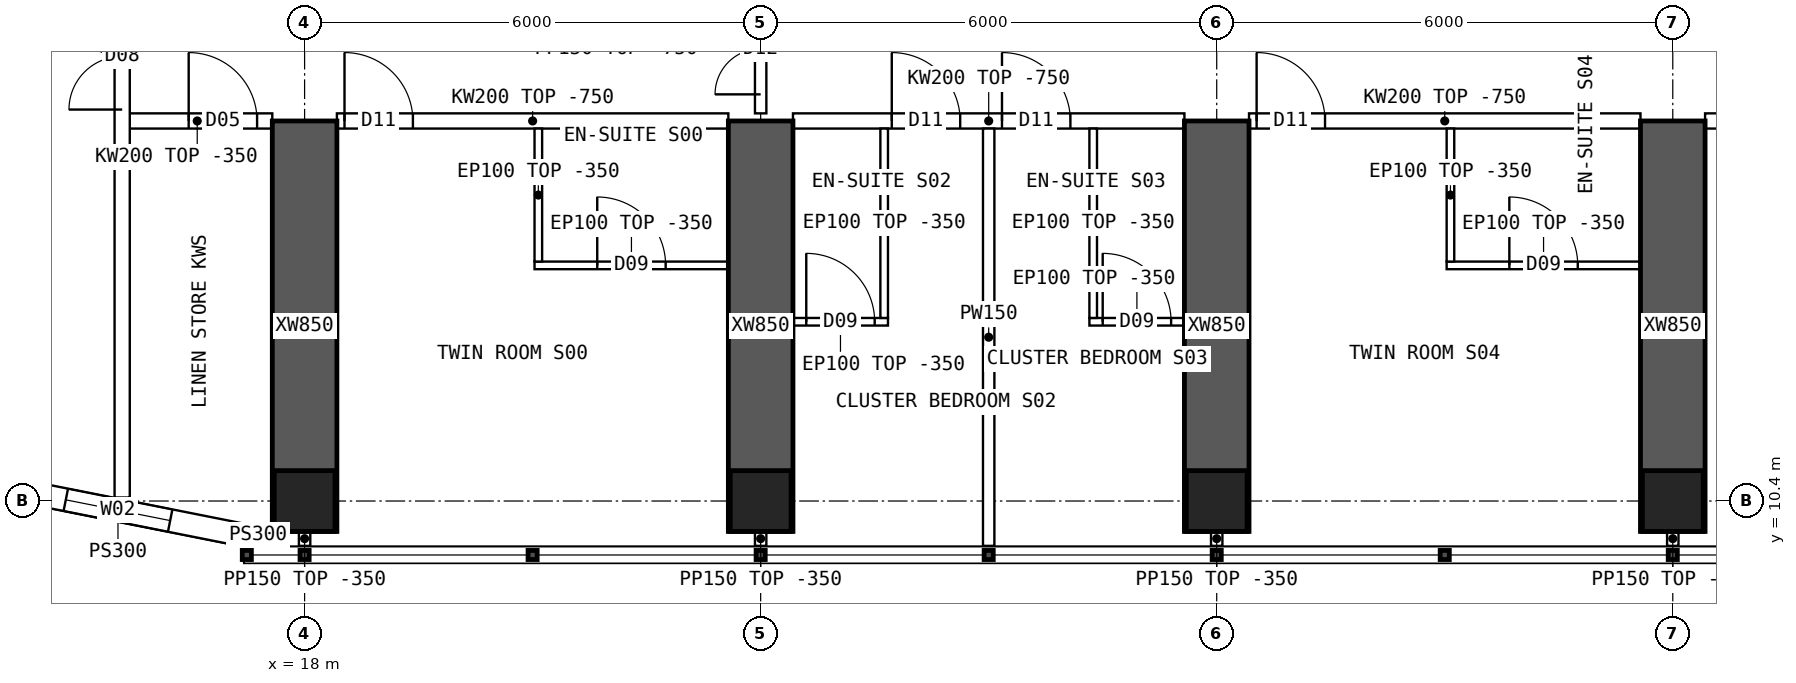
"""IFC4 building model, lengths in metres.
Left out: names, types, materials, properties, quantities, classifications, styles, units other than length and angle.
Written with IfcOpenShell. Run it as: python <this file> out.ifc"""

import sys

from ifc_helpers import new_model, si_unit, direction, frame, frame_2d, origin, origin_2d, place, context, subcontext, project, spatial, polyline, rectangle, hollow_rectangle, outline, extrude, element, fill, save


model = new_model("IFC4")
c1 = context("Model", 3, precision=1e-05, world=origin(), true_north=direction((0.0, 1.0)))
c2 = subcontext(c1, "Body", "Model", "MODEL_VIEW")
j1 = project(units=[si_unit("LENGTHUNIT", "METRE"), si_unit("PLANEANGLEUNIT", "RADIAN")], contexts=[c1])
p1 = place(None, origin())
s1 = spatial("IfcSite", under=j1, at=p1, CompositionType="ELEMENT")
p2 = place(p1, origin())
s2 = spatial("IfcBuilding", under=s1, at=p2, CompositionType="ELEMENT")
p3 = place(p2, frame((0.0, 0.0, 197.35)))
s3 = spatial("IfcBuildingStorey", under=s2, at=p3, CompositionType="ELEMENT", Elevation=197.35)
for number, where, z_axis, x_axis in (
    (1, (18.0, 10.4, 0.0), (0.0, 0.0, 1.0), (1.0, 0.0, 0.0)),
    (2, (24.0, 10.4, 0.0), (0.0, 0.0, 1.0), (1.0, 0.0, 0.0)),
    (3, (30.0, 10.4, 0.0), (0.0, 0.0, 1.0), (1.0, 0.0, 0.0)),
    (4, (36.0, 10.4, 0.0), (0.0, 0.0, 1.0), (1.0, 0.0, 0.0)),
):
    element("IfcColumn", number, at=place(p3, frame(where, z_axis=z_axis, x_axis=x_axis)), inside=s3, PredefinedType="COLUMN", context=c2, shape_type="SweptSolid", body=[
        extrude(hollow_rectangle(XDim=0.8, YDim=0.8, WallThickness=0.08, at=origin_2d()), origin(), (0.0, 0.0, 1.0), 3.75),
    ])
for number, where, z_axis, x_axis in (
    (5, (18.0, 10.0, 0.0), (0.0, 0.0, 1.0), (0.0, 1.0, 0.0)),
    (6, (24.0, 10.0, 0.0), (0.0, 0.0, 1.0), (0.0, 1.0, 0.0)),
    (7, (30.0, 10.0, 0.0), (0.0, 0.0, 1.0), (0.0, 1.0, 0.0)),
    (8, (36.0, 10.0, 0.0), (0.0, 0.0, 1.0), (0.0, 1.0, 0.0)),
):
    element("IfcWall", number, at=place(p3, frame(where, z_axis=z_axis, x_axis=x_axis)), inside=s3, PredefinedType="SHEAR", context=c2, shape_type="SweptSolid", body=[
        extrude(rectangle(XDim=5.4, YDim=0.85, at=frame_2d((2.7, 0.0))), origin(), (0.0, 0.0, 1.0), 3.75),
    ])
p4 = place(p3, frame((13.89, 10.608, 0.0), z_axis=(0.0, 0.0, 1.0), x_axis=(0.98078325777, -0.195100490205, 0.0)))
e9 = element("IfcWall", 9, at=p4, inside=s3, PredefinedType="SOLIDWALL", context=c2, shape_type="SweptSolid", body=[
    extrude(outline(polyline([(-0.03, -0.15), (3.405, -0.15), (3.345, 0.15), (0.03, 0.15), (-0.03, -0.15)])), origin(), (0.0, 0.0, 1.0), 3.4),
])
p5 = place(p4, frame((0.988, 0.0, 0.9)))
e10 = element("IfcOpeningElement", 10, at=p5, cuts=e9, PredefinedType="OPENING", context=c2, shape_type="SweptSolid", body=[
    extrude(rectangle(XDim=1.4, YDim=1.8, at=frame_2d((0.7, 0.9))), frame((0.0, 0.16, 0.0), z_axis=(0.0, -1.0, 0.0), x_axis=(1.0, 0.0, 0.0)), (0.0, 0.0, 1.0), 0.32),
])
p6 = place(p3, frame((17.2, 9.95, 0.0), z_axis=(0.0, 0.0, 1.0), x_axis=(1.0, 0.0, 0.0)))
e11 = element("IfcWall", 11, at=p6, inside=s3, PredefinedType="SOLIDWALL", context=c2, shape_type="SweptSolid", body=[
    extrude(rectangle(XDim=0.375, YDim=0.3, at=frame_2d((0.188, 0.0))), origin(), (0.0, 0.0, 1.0), 3.4),
])
p7 = place(p3, frame((15.6, 15.4, 0.0), z_axis=(0.0, 0.0, 1.0), x_axis=(1.0, 0.0, 0.0)))
e12 = element("IfcWall", 12, at=p7, inside=s3, PredefinedType="SOLIDWALL", context=c2, shape_type="SweptSolid", body=[
    extrude(rectangle(XDim=1.975, YDim=0.2, at=frame_2d((0.987, 0.0))), origin(), (0.0, 0.0, 1.0), 3.4),
])
p8 = place(p7, frame((0.875, 0.0, 0.0)))
e13 = element("IfcOpeningElement", 13, at=p8, cuts=e12, PredefinedType="OPENING", context=c2, shape_type="SweptSolid", body=[
    extrude(rectangle(XDim=0.9, YDim=2.1, at=frame_2d((0.45, 1.05))), frame((0.0, 0.11, 0.0), z_axis=(0.0, -1.0, 0.0), x_axis=(1.0, 0.0, 0.0)), (0.0, 0.0, 1.0), 0.22),
])
p9 = place(p3, frame((18.425, 15.4, 0.0), z_axis=(0.0, 0.0, 1.0), x_axis=(1.0, 0.0, 0.0)))
e14 = element("IfcWall", 14, at=p9, inside=s3, PredefinedType="SOLIDWALL", context=c2, shape_type="SweptSolid", body=[
    extrude(outline(polyline([(0.0, 0.0), (5.15, 0.0), (5.15, 3.0), (0.0, 3.0), (0.0, 0.0)])), frame((0.0, 0.1, 0.0), z_axis=(0.0, -1.0, 0.0), x_axis=(1.0, 0.0, 0.0)), (0.0, 0.0, 1.0), 0.2),
])
p10 = place(p9, frame((0.1, 0.0, 0.0)))
e15 = element("IfcOpeningElement", 15, at=p10, cuts=e14, PredefinedType="OPENING", context=c2, shape_type="SweptSolid", body=[
    extrude(rectangle(XDim=0.9, YDim=2.1, at=frame_2d((0.45, 1.05))), frame((0.0, 0.11, 0.0), z_axis=(0.0, -1.0, 0.0), x_axis=(1.0, 0.0, 0.0)), (0.0, 0.0, 1.0), 0.22),
])
p11 = place(p3, frame((24.425, 15.4, 0.0), z_axis=(0.0, 0.0, 1.0), x_axis=(1.0, 0.0, 0.0)))
e16 = element("IfcWall", 16, at=p11, inside=s3, PredefinedType="SOLIDWALL", context=c2, shape_type="SweptSolid", body=[
    extrude(outline(polyline([(0.0, 0.0), (5.15, 0.0), (5.15, 3.0), (0.0, 3.0), (0.0, 0.0)])), frame((0.0, 0.1, 0.0), z_axis=(0.0, -1.0, 0.0), x_axis=(1.0, 0.0, 0.0)), (0.0, 0.0, 1.0), 0.2),
])
p12 = place(p11, frame((1.3, 0.0, 0.0)))
e17 = element("IfcOpeningElement", 17, at=p12, cuts=e16, PredefinedType="OPENING", context=c2, shape_type="SweptSolid", body=[
    extrude(rectangle(XDim=0.9, YDim=2.1, at=frame_2d((0.45, 1.05))), frame((0.0, 0.11, 0.0), z_axis=(0.0, -1.0, 0.0), x_axis=(1.0, 0.0, 0.0)), (0.0, 0.0, 1.0), 0.22),
])
p13 = place(p11, frame((2.75, 0.0, 0.0)))
e18 = element("IfcOpeningElement", 18, at=p13, cuts=e16, PredefinedType="OPENING", context=c2, shape_type="SweptSolid", body=[
    extrude(rectangle(XDim=0.9, YDim=2.1, at=frame_2d((0.45, 1.05))), frame((0.0, 0.11, 0.0), z_axis=(0.0, -1.0, 0.0), x_axis=(1.0, 0.0, 0.0)), (0.0, 0.0, 1.0), 0.22),
])
p14 = place(p3, frame((30.425, 15.4, 0.0), z_axis=(0.0, 0.0, 1.0), x_axis=(1.0, 0.0, 0.0)))
e19 = element("IfcWall", 19, at=p14, inside=s3, PredefinedType="SOLIDWALL", context=c2, shape_type="SweptSolid", body=[
    extrude(outline(polyline([(0.0, 0.0), (5.15, 0.0), (5.15, 3.0), (0.0, 3.0), (0.0, 0.0)])), frame((0.0, 0.1, 0.0), z_axis=(0.0, -1.0, 0.0), x_axis=(1.0, 0.0, 0.0)), (0.0, 0.0, 1.0), 0.2),
])
p15 = place(p14, frame((0.1, 0.0, 0.0)))
e20 = element("IfcOpeningElement", 20, at=p15, cuts=e19, PredefinedType="OPENING", context=c2, shape_type="SweptSolid", body=[
    extrude(rectangle(XDim=0.9, YDim=2.1, at=frame_2d((0.45, 1.05))), frame((0.0, 0.11, 0.0), z_axis=(0.0, -1.0, 0.0), x_axis=(1.0, 0.0, 0.0)), (0.0, 0.0, 1.0), 0.22),
])
p16 = place(p3, frame((36.425, 15.4, 0.0), z_axis=(0.0, 0.0, 1.0), x_axis=(1.0, 0.0, 0.0)))
e21 = element("IfcWall", 21, at=p16, inside=s3, PredefinedType="SOLIDWALL", context=c2, shape_type="SweptSolid", body=[
    extrude(outline(polyline([(0.0, 0.0), (5.15, 0.0), (5.15, 3.0), (0.0, 3.0), (0.0, 0.0)])), frame((0.0, 0.1, 0.0), z_axis=(0.0, -1.0, 0.0), x_axis=(1.0, 0.0, 0.0)), (0.0, 0.0, 1.0), 0.2),
])
p17 = place(p16, frame((0.3, 0.0, 0.0)))
e22 = element("IfcOpeningElement", 22, at=p17, cuts=e21, PredefinedType="OPENING", context=c2, shape_type="SweptSolid", body=[
    extrude(rectangle(XDim=1.0, YDim=2.1, at=frame_2d((0.5, 1.05))), frame((0.0, 0.11, 0.0), z_axis=(0.0, -1.0, 0.0), x_axis=(1.0, 0.0, 0.0)), (0.0, 0.0, 1.0), 0.22),
])
p18 = place(p3, frame((23.575, 13.5, 0.0), z_axis=(0.0, 0.0, 1.0), x_axis=(-1.0, 0.0, 0.0)))
e23 = element("IfcWall", 23, at=p18, inside=s3, PredefinedType="PARTITIONING", context=c2, shape_type="SweptSolid", body=[
    extrude(rectangle(XDim=2.55, YDim=0.1, at=frame_2d((1.275, 0.0))), origin(), (0.0, 0.0, 1.0), 3.4),
])
p19 = place(p18, frame((0.825, 0.0, 0.0)))
e24 = element("IfcOpeningElement", 24, at=p19, cuts=e23, PredefinedType="OPENING", context=c2, shape_type="SweptSolid", body=[
    extrude(rectangle(XDim=0.9, YDim=2.1, at=frame_2d((0.45, 1.05))), frame((0.0, 0.06, 0.0), z_axis=(0.0, -1.0, 0.0), x_axis=(1.0, 0.0, 0.0)), (0.0, 0.0, 1.0), 0.12),
])
p20 = place(p3, frame((21.075, 13.55, 0.0), z_axis=(0.0, 0.0, 1.0), x_axis=(0.0, 1.0, 0.0)))
e25 = element("IfcWall", 25, at=p20, inside=s3, PredefinedType="PARTITIONING", context=c2, shape_type="SweptSolid", body=[
    extrude(outline(polyline([(0.0, 0.0), (1.75, 0.0), (1.75, 3.0), (1.702, 3.0), (1.7, 3.4), (0.0, 3.4), (0.0, 0.0)])), frame((0.0, 0.05, 0.0), z_axis=(0.0, -1.0, 0.0), x_axis=(1.0, 0.0, 0.0)), (0.0, 0.0, 1.0), 0.1),
])
p21 = place(p3, frame((27.0, 9.81, 0.0), z_axis=(0.0, 0.0, 1.0), x_axis=(0.0, 1.0, 0.0)))
e26 = element("IfcWall", 26, at=p21, inside=s3, PredefinedType="PARTITIONING", context=c2, shape_type="SweptSolid", body=[
    extrude(outline(polyline([(0.0, 0.0), (5.49, 0.0), (5.49, 3.0), (5.442, 3.0), (5.44, 3.4), (0.792, 3.4), (0.79, 3.0), (0.392, 3.0), (0.39, 3.4), (0.0, 3.4), (0.0, 0.0)])), frame((0.0, 0.075, 0.0), z_axis=(0.0, -1.0, 0.0), x_axis=(1.0, 0.0, 0.0)), (0.0, 0.0, 1.0), 0.15),
])
p22 = place(p3, frame((25.675, 12.758, 0.0), z_axis=(0.0, 0.0, 1.0), x_axis=(-1.0, 0.0, 0.0)))
e27 = element("IfcWall", 27, at=p22, inside=s3, PredefinedType="PARTITIONING", context=c2, shape_type="SweptSolid", body=[
    extrude(rectangle(XDim=1.25, YDim=0.1, at=frame_2d((0.625, 0.0))), origin(), (0.0, 0.0, 1.0), 3.4),
])
p23 = place(p22, frame((0.175, 0.0, 0.0)))
e28 = element("IfcOpeningElement", 28, at=p23, cuts=e27, PredefinedType="OPENING", context=c2, shape_type="SweptSolid", body=[
    extrude(rectangle(XDim=0.9, YDim=2.1, at=frame_2d((0.45, 1.05))), frame((0.0, 0.06, 0.0), z_axis=(0.0, -1.0, 0.0), x_axis=(1.0, 0.0, 0.0)), (0.0, 0.0, 1.0), 0.12),
])
p24 = place(p3, frame((25.625, 12.808, 0.0), z_axis=(0.0, 0.0, 1.0), x_axis=(0.0, 1.0, 0.0)))
e29 = element("IfcWall", 29, at=p24, inside=s3, PredefinedType="PARTITIONING", context=c2, shape_type="SweptSolid", body=[
    extrude(outline(polyline([(0.0, 0.0), (2.492, 0.0), (2.492, 3.0), (2.444, 3.0), (2.442, 3.4), (0.0, 3.4), (0.0, 0.0)])), frame((0.0, 0.05, 0.0), z_axis=(0.0, -1.0, 0.0), x_axis=(1.0, 0.0, 0.0)), (0.0, 0.0, 1.0), 0.1),
])
p25 = place(p3, frame((29.575, 12.758, 0.0), z_axis=(0.0, 0.0, 1.0), x_axis=(-1.0, 0.0, 0.0)))
e30 = element("IfcWall", 30, at=p25, inside=s3, PredefinedType="PARTITIONING", context=c2, shape_type="SweptSolid", body=[
    extrude(rectangle(XDim=1.25, YDim=0.1, at=frame_2d((0.625, 0.0))), origin(), (0.0, 0.0, 1.0), 3.4),
])
p26 = place(p25, frame((0.175, 0.0, 0.0)))
e31 = element("IfcOpeningElement", 31, at=p26, cuts=e30, PredefinedType="OPENING", context=c2, shape_type="SweptSolid", body=[
    extrude(rectangle(XDim=0.9, YDim=2.1, at=frame_2d((0.45, 1.05))), frame((0.0, 0.06, 0.0), z_axis=(0.0, -1.0, 0.0), x_axis=(1.0, 0.0, 0.0)), (0.0, 0.0, 1.0), 0.12),
])
p27 = place(p3, frame((28.375, 12.808, 0.0), z_axis=(0.0, 0.0, 1.0), x_axis=(0.0, 1.0, 0.0)))
e32 = element("IfcWall", 32, at=p27, inside=s3, PredefinedType="PARTITIONING", context=c2, shape_type="SweptSolid", body=[
    extrude(outline(polyline([(0.0, 0.0), (2.492, 0.0), (2.492, 3.0), (2.444, 3.0), (2.442, 3.4), (0.0, 3.4), (0.0, 0.0)])), frame((0.0, 0.05, 0.0), z_axis=(0.0, -1.0, 0.0), x_axis=(1.0, 0.0, 0.0)), (0.0, 0.0, 1.0), 0.1),
])
p28 = place(p3, frame((35.575, 13.5, 0.0), z_axis=(0.0, 0.0, 1.0), x_axis=(-1.0, 0.0, 0.0)))
e33 = element("IfcWall", 33, at=p28, inside=s3, PredefinedType="PARTITIONING", context=c2, shape_type="SweptSolid", body=[
    extrude(rectangle(XDim=2.55, YDim=0.1, at=frame_2d((1.275, 0.0))), origin(), (0.0, 0.0, 1.0), 3.4),
])
p29 = place(p28, frame((0.825, 0.0, 0.0)))
e34 = element("IfcOpeningElement", 34, at=p29, cuts=e33, PredefinedType="OPENING", context=c2, shape_type="SweptSolid", body=[
    extrude(rectangle(XDim=0.9, YDim=2.1, at=frame_2d((0.45, 1.05))), frame((0.0, 0.06, 0.0), z_axis=(0.0, -1.0, 0.0), x_axis=(1.0, 0.0, 0.0)), (0.0, 0.0, 1.0), 0.12),
])
p30 = place(p3, frame((33.075, 13.55, 0.0), z_axis=(0.0, 0.0, 1.0), x_axis=(0.0, 1.0, 0.0)))
e35 = element("IfcWall", 35, at=p30, inside=s3, PredefinedType="PARTITIONING", context=c2, shape_type="SweptSolid", body=[
    extrude(outline(polyline([(0.0, 0.0), (1.75, 0.0), (1.75, 3.0), (1.702, 3.0), (1.7, 3.4), (0.0, 3.4), (0.0, 0.0)])), frame((0.0, 0.05, 0.0), z_axis=(0.0, -1.0, 0.0), x_axis=(1.0, 0.0, 0.0)), (0.0, 0.0, 1.0), 0.1),
])
p31 = place(p3, frame((24.0, 15.5, 0.0), z_axis=(0.0, 0.0, 1.0), x_axis=(0.0, 1.0, 0.0)))
e36 = element("IfcWall", 36, at=p31, inside=s3, PredefinedType="PARTITIONING", context=c2, shape_type="SweptSolid", body=[
    extrude(outline(polyline([(0.0, 0.0), (1.7, 0.0), (1.7, 3.0), (0.0, 3.0), (0.0, 0.0)])), frame((0.0, 0.075, 0.0), z_axis=(0.0, -1.0, 0.0), x_axis=(1.0, 0.0, 0.0)), (0.0, 0.0, 1.0), 0.15),
])
p32 = place(p31, frame((0.25, 0.0, 0.0)))
e37 = element("IfcOpeningElement", 37, at=p32, cuts=e36, PredefinedType="OPENING", context=c2, shape_type="SweptSolid", body=[
    extrude(rectangle(XDim=1.2, YDim=2.1, at=frame_2d((0.6, 1.05))), frame((0.0, 0.085, 0.0), z_axis=(0.0, -1.0, 0.0), x_axis=(1.0, 0.0, 0.0)), (0.0, 0.0, 1.0), 0.17),
])
p33 = place(p3, frame((15.6, 10.446, 0.0), z_axis=(0.0, 0.0, 1.0), x_axis=(0.0, 1.0, 0.0)))
e38 = element("IfcWall", 38, at=p33, inside=s3, PredefinedType="SOLIDWALL", context=c2, shape_type="SweptSolid", body=[
    extrude(rectangle(XDim=43.107, YDim=0.2, at=frame_2d((21.554, 0.0))), origin(), (0.0, 0.0, 1.0), 3.4),
])
p34 = place(p33, frame((5.104, 0.0, 0.0)))
e39 = element("IfcOpeningElement", 39, at=p34, cuts=e38, PredefinedType="OPENING", context=c2, shape_type="SweptSolid", body=[
    extrude(rectangle(XDim=1.4, YDim=2.1, at=frame_2d((0.7, 1.05))), frame((0.0, 0.11, 0.0), z_axis=(0.0, -1.0, 0.0), x_axis=(1.0, 0.0, 0.0)), (0.0, 0.0, 1.0), 0.22),
])
p35 = place(p33, frame((36.504, 0.0, 0.0)))
e40 = element("IfcOpeningElement", 40, at=p35, cuts=e38, PredefinedType="OPENING", context=c2, shape_type="SweptSolid", body=[
    extrude(rectangle(XDim=1.4, YDim=2.1, at=frame_2d((0.7, 1.05))), frame((0.0, 0.11, 0.0), z_axis=(0.0, -1.0, 0.0), x_axis=(1.0, 0.0, 0.0)), (0.0, 0.0, 1.0), 0.22),
])
for number, where, z_axis, x_axis in (
    (41, (18.0, 10.0, 0.0), (0.0, 0.0, 1.0), (0.0, -1.0, 0.0)),
    (42, (24.0, 10.0, 0.0), (0.0, 0.0, 1.0), (0.0, -1.0, 0.0)),
    (43, (30.0, 10.0, 0.0), (0.0, 0.0, 1.0), (0.0, -1.0, 0.0)),
    (44, (36.0, 10.0, 0.0), (0.0, 0.0, 1.0), (0.0, -1.0, 0.0)),
):
    element("IfcWall", number, at=place(p3, frame(where, z_axis=z_axis, x_axis=x_axis)), inside=s3, PredefinedType="PARTITIONING", context=c2, shape_type="SweptSolid", body=[
        extrude(rectangle(XDim=0.19, YDim=0.15, at=frame_2d((0.095, 0.0))), origin(), (0.0, 0.0, 1.0), 3.4),
    ])
p36 = place(p5, origin())
e45 = element("IfcWindow", 45, at=p36, inside=s3, PartitioningType="SINGLE_PANEL", PredefinedType="WINDOW", context=c2, shape_type="SweptSolid", body=[
    extrude(rectangle(XDim=1.4, YDim=1.8, at=frame_2d((0.7, 0.9))), frame((0.0, 0.03, 0.0), z_axis=(0.0, -1.0, 0.0), x_axis=(1.0, 0.0, 0.0)), (0.0, 0.0, 1.0), 0.06),
])
fill(e10, e45)
p37 = place(p19, origin())
e46 = element("IfcDoor", 46, at=p37, inside=s3, OperationType="SINGLE_SWING_RIGHT", PredefinedType="DOOR", context=c2, shape_type="SweptSolid", body=[
    extrude(rectangle(XDim=0.9, YDim=2.1, at=frame_2d((0.45, 1.05))), frame((0.0, 0.025, 0.0), z_axis=(0.0, -1.0, 0.0), x_axis=(1.0, 0.0, 0.0)), (0.0, 0.0, 1.0), 0.05),
])
fill(e24, e46)
p38 = place(p10, origin())
e47 = element("IfcDoor", 47, at=p38, inside=s3, OperationType="SINGLE_SWING_LEFT", PredefinedType="DOOR", context=c2, shape_type="SweptSolid", body=[
    extrude(rectangle(XDim=0.9, YDim=2.1, at=frame_2d((0.45, 1.05))), frame((0.0, 0.025, 0.0), z_axis=(0.0, -1.0, 0.0), x_axis=(1.0, 0.0, 0.0)), (0.0, 0.0, 1.0), 0.05),
])
fill(e15, e47)
p39 = place(p23, origin())
e48 = element("IfcDoor", 48, at=p39, inside=s3, OperationType="SINGLE_SWING_RIGHT", PredefinedType="DOOR", context=c2, shape_type="SweptSolid", body=[
    extrude(rectangle(XDim=0.9, YDim=2.1, at=frame_2d((0.45, 1.05))), frame((0.0, 0.025, 0.0), z_axis=(0.0, -1.0, 0.0), x_axis=(1.0, 0.0, 0.0)), (0.0, 0.0, 1.0), 0.05),
])
fill(e28, e48)
p40 = place(p12, origin())
e49 = element("IfcDoor", 49, at=p40, inside=s3, OperationType="SINGLE_SWING_LEFT", PredefinedType="DOOR", context=c2, shape_type="SweptSolid", body=[
    extrude(rectangle(XDim=0.9, YDim=2.1, at=frame_2d((0.45, 1.05))), frame((0.0, 0.025, 0.0), z_axis=(0.0, -1.0, 0.0), x_axis=(1.0, 0.0, 0.0)), (0.0, 0.0, 1.0), 0.05),
])
fill(e17, e49)
p41 = place(p26, origin())
e50 = element("IfcDoor", 50, at=p41, inside=s3, OperationType="SINGLE_SWING_RIGHT", PredefinedType="DOOR", context=c2, shape_type="SweptSolid", body=[
    extrude(rectangle(XDim=0.9, YDim=2.1, at=frame_2d((0.45, 1.05))), frame((0.0, 0.025, 0.0), z_axis=(0.0, -1.0, 0.0), x_axis=(1.0, 0.0, 0.0)), (0.0, 0.0, 1.0), 0.05),
])
fill(e31, e50)
p42 = place(p13, origin())
e51 = element("IfcDoor", 51, at=p42, inside=s3, OperationType="SINGLE_SWING_LEFT", PredefinedType="DOOR", context=c2, shape_type="SweptSolid", body=[
    extrude(rectangle(XDim=0.9, YDim=2.1, at=frame_2d((0.45, 1.05))), frame((0.0, 0.025, 0.0), z_axis=(0.0, -1.0, 0.0), x_axis=(1.0, 0.0, 0.0)), (0.0, 0.0, 1.0), 0.05),
])
fill(e18, e51)
p43 = place(p29, origin())
e52 = element("IfcDoor", 52, at=p43, inside=s3, OperationType="SINGLE_SWING_RIGHT", PredefinedType="DOOR", context=c2, shape_type="SweptSolid", body=[
    extrude(rectangle(XDim=0.9, YDim=2.1, at=frame_2d((0.45, 1.05))), frame((0.0, 0.025, 0.0), z_axis=(0.0, -1.0, 0.0), x_axis=(1.0, 0.0, 0.0)), (0.0, 0.0, 1.0), 0.05),
])
fill(e34, e52)
p44 = place(p15, origin())
e53 = element("IfcDoor", 53, at=p44, inside=s3, OperationType="SINGLE_SWING_LEFT", PredefinedType="DOOR", context=c2, shape_type="SweptSolid", body=[
    extrude(rectangle(XDim=0.9, YDim=2.1, at=frame_2d((0.45, 1.05))), frame((0.0, 0.025, 0.0), z_axis=(0.0, -1.0, 0.0), x_axis=(1.0, 0.0, 0.0)), (0.0, 0.0, 1.0), 0.05),
])
fill(e20, e53)
p45 = place(p32, origin())
e54 = element("IfcDoor", 54, at=p45, inside=s3, OperationType="DOUBLE_DOOR_SINGLE_SWING", PredefinedType="DOOR", context=c2, shape_type="SweptSolid", body=[
    extrude(rectangle(XDim=1.2, YDim=2.1, at=frame_2d((0.6, 1.05))), frame((0.0, 0.025, 0.0), z_axis=(0.0, -1.0, 0.0), x_axis=(1.0, 0.0, 0.0)), (0.0, 0.0, 1.0), 0.05),
])
fill(e37, e54)
p46 = place(p34, origin())
e55 = element("IfcDoor", 55, at=p46, inside=s3, OperationType="DOUBLE_DOOR_SINGLE_SWING", PredefinedType="DOOR", context=c2, shape_type="SweptSolid", body=[
    extrude(rectangle(XDim=1.4, YDim=2.1, at=frame_2d((0.7, 1.05))), frame((0.0, 0.025, 0.0), z_axis=(0.0, -1.0, 0.0), x_axis=(1.0, 0.0, 0.0)), (0.0, 0.0, 1.0), 0.05),
])
fill(e39, e55)
p47 = place(p8, origin())
e56 = element("IfcDoor", 56, at=p47, inside=s3, OperationType="SINGLE_SWING_LEFT", PredefinedType="DOOR", context=c2, shape_type="SweptSolid", body=[
    extrude(rectangle(XDim=0.9, YDim=2.1, at=frame_2d((0.45, 1.05))), frame((0.0, 0.025, 0.0), z_axis=(0.0, -1.0, 0.0), x_axis=(1.0, 0.0, 0.0)), (0.0, 0.0, 1.0), 0.05),
])
fill(e13, e56)
save(model, sys.argv[1])
